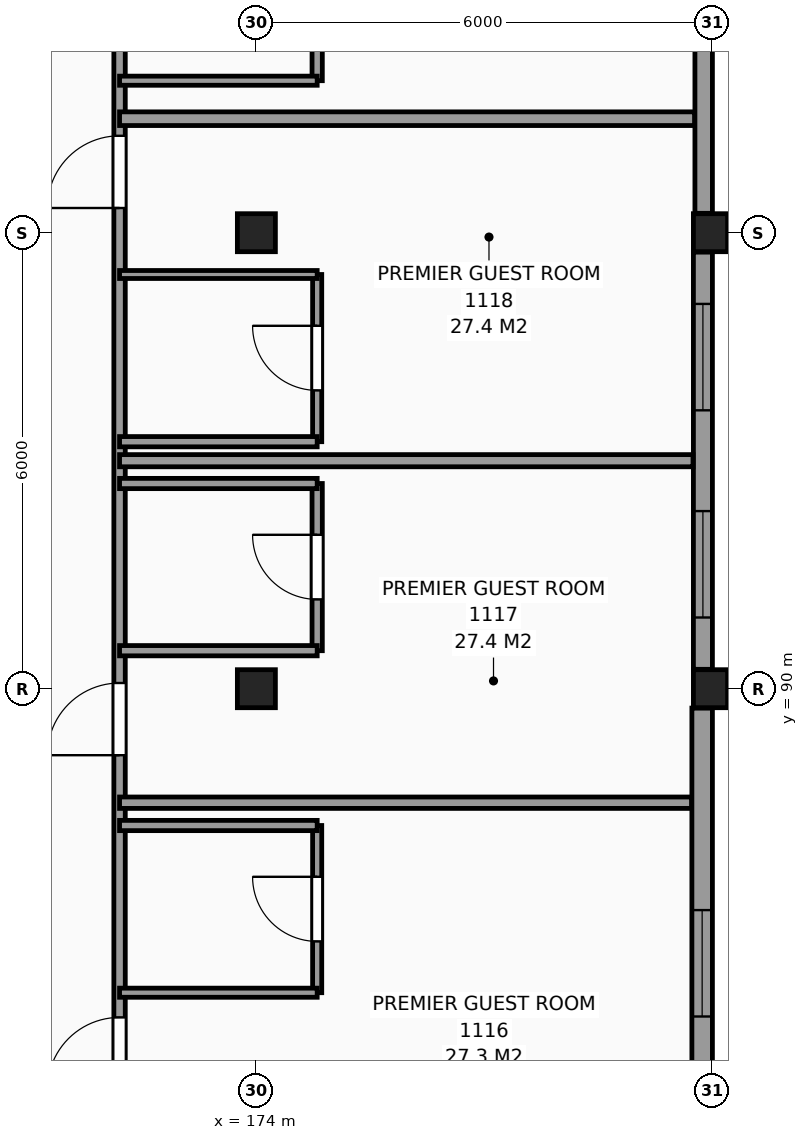
"""IFC4 building model, lengths in metres.
Left out: names, types, materials, properties, quantities, classifications, styles, units other than length and angle.
Written with IfcOpenShell. Run it as: python <this file> out.ifc"""

import sys

from ifc_helpers import new_model, si_unit, direction, frame, frame_2d, origin, origin_2d, place, context, subcontext, project, spatial, rectangle, extrude, element, fill, save


model = new_model("IFC4")
c1 = context("Model", 3, precision=1e-05, world=origin(), true_north=direction((0.0, 1.0)))
c2 = subcontext(c1, "Body", "Model", "MODEL_VIEW")
j1 = project(units=[si_unit("LENGTHUNIT", "METRE"), si_unit("PLANEANGLEUNIT", "RADIAN")], contexts=[c1])
p1 = place(None, origin())
s1 = spatial("IfcSite", under=j1, at=p1, CompositionType="ELEMENT")
p2 = place(p1, origin())
s2 = spatial("IfcBuilding", under=s1, at=p2, CompositionType="ELEMENT")
p3 = place(p2, frame((0.0, 0.0, 44.7)))
s3 = spatial("IfcBuildingStorey", under=s2, at=p3, CompositionType="ELEMENT", Elevation=44.7)
for number, where, z_axis, x_axis in (
    (1, (174.0, 90.0, 0.0), (0.0, 0.0, 1.0), (1.0, 0.0, 0.0)),
    (2, (174.0, 96.0, 0.0), (0.0, 0.0, 1.0), (1.0, 0.0, 0.0)),
    (3, (180.0, 90.0, 0.0), (0.0, 0.0, 1.0), (1.0, 0.0, 0.0)),
    (4, (180.0, 96.0, 0.0), (0.0, 0.0, 1.0), (1.0, 0.0, 0.0)),
):
    element("IfcColumn", number, at=place(p3, frame(where, z_axis=z_axis, x_axis=x_axis)), inside=s3, PredefinedType="COLUMN", context=c2, shape_type="SweptSolid", body=[
        extrude(rectangle(XDim=0.5, YDim=0.5, at=origin_2d()), origin(), (0.0, 0.0, 1.0), 3.3),
    ])
p4 = place(p3, frame((179.865, 84.255, 0.0), z_axis=(0.0, 0.0, 1.0), x_axis=(0.0, 1.0, 0.0)))
e5 = element("IfcWall", 5, at=p4, inside=s3, PredefinedType="SOLIDWALL", context=c2, shape_type="SweptSolid", body=[
    extrude(rectangle(XDim=5.49, YDim=0.27, at=frame_2d((2.745, 0.0))), origin(), (0.0, 0.0, 1.0), 2.4),
])
p5 = place(p4, frame((1.432, 0.0, 0.8)))
e6 = element("IfcOpeningElement", 6, at=p5, cuts=e5, PredefinedType="OPENING", context=c2, shape_type="SweptSolid", body=[
    extrude(rectangle(XDim=1.4, YDim=1.4, at=frame_2d((0.7, 0.7))), frame((0.0, 0.145, 0.0), z_axis=(0.0, -1.0, 0.0), x_axis=(1.0, 0.0, 0.0)), (0.0, 0.0, 1.0), 0.29),
])
p6 = place(p3, frame((179.875, 90.255, 0.0), z_axis=(0.0, 0.0, 1.0), x_axis=(0.0, 1.0, 0.0)))
e7 = element("IfcWall", 7, at=p6, inside=s3, PredefinedType="SOLIDWALL", context=c2, shape_type="SweptSolid", body=[
    extrude(rectangle(XDim=5.49, YDim=0.25, at=frame_2d((2.745, 0.0))), origin(), (0.0, 0.0, 1.0), 2.4),
])
p7 = place(p6, frame((0.682, 0.0, 0.8)))
e8 = element("IfcOpeningElement", 8, at=p7, cuts=e7, PredefinedType="OPENING", context=c2, shape_type="SweptSolid", body=[
    extrude(rectangle(XDim=1.4, YDim=1.4, at=frame_2d((0.7, 0.7))), frame((0.0, 0.135, 0.0), z_axis=(0.0, -1.0, 0.0), x_axis=(1.0, 0.0, 0.0)), (0.0, 0.0, 1.0), 0.27),
])
p8 = place(p6, frame((3.408, 0.0, 0.8)))
e9 = element("IfcOpeningElement", 9, at=p8, cuts=e7, PredefinedType="OPENING", context=c2, shape_type="SweptSolid", body=[
    extrude(rectangle(XDim=1.4, YDim=1.4, at=frame_2d((0.7, 0.7))), frame((0.0, 0.135, 0.0), z_axis=(0.0, -1.0, 0.0), x_axis=(1.0, 0.0, 0.0)), (0.0, 0.0, 1.0), 0.27),
])
p9 = place(p3, frame((179.885, 96.255, 0.0), z_axis=(0.0, 0.0, 1.0), x_axis=(0.0, 1.0, 0.0)))
e10 = element("IfcWall", 10, at=p9, inside=s3, PredefinedType="SOLIDWALL", context=c2, shape_type="SweptSolid", body=[
    extrude(rectangle(XDim=5.49, YDim=0.23, at=frame_2d((2.745, 0.0))), origin(), (0.0, 0.0, 1.0), 2.4),
])
p10 = place(p3, frame((172.2, 66.255, 0.0), z_axis=(0.0, 0.0, 1.0), x_axis=(0.0, 1.0, 0.0)))
e11 = element("IfcWall", 11, at=p10, inside=s3, PredefinedType="PARTITIONING", context=c2, shape_type="SweptSolid", body=[
    extrude(rectangle(XDim=41.565, YDim=0.15, at=frame_2d((20.783, 0.0))), origin(), (0.0, 0.0, 1.0), 3.05),
])
p11 = place(p10, frame((7.57, 0.0, 0.0)))
e12 = element("IfcOpeningElement", 12, at=p11, cuts=e11, PredefinedType="OPENING", context=c2, shape_type="SweptSolid", body=[
    extrude(rectangle(XDim=0.95, YDim=2.1, at=frame_2d((0.475, 1.05))), frame((0.0, 0.085, 0.0), z_axis=(0.0, -1.0, 0.0), x_axis=(1.0, 0.0, 0.0)), (0.0, 0.0, 1.0), 0.17),
])
p12 = place(p10, frame((9.37, 0.0, 0.0)))
e13 = element("IfcOpeningElement", 13, at=p12, cuts=e11, PredefinedType="OPENING", context=c2, shape_type="SweptSolid", body=[
    extrude(rectangle(XDim=0.95, YDim=2.1, at=frame_2d((0.475, 1.05))), frame((0.0, 0.085, 0.0), z_axis=(0.0, -1.0, 0.0), x_axis=(1.0, 0.0, 0.0)), (0.0, 0.0, 1.0), 0.17),
])
p13 = place(p10, frame((18.47, 0.0, 0.0)))
e14 = element("IfcOpeningElement", 14, at=p13, cuts=e11, PredefinedType="OPENING", context=c2, shape_type="SweptSolid", body=[
    extrude(rectangle(XDim=0.95, YDim=2.1, at=frame_2d((0.475, 1.05))), frame((0.0, 0.085, 0.0), z_axis=(0.0, -1.0, 0.0), x_axis=(1.0, 0.0, 0.0)), (0.0, 0.0, 1.0), 0.17),
])
p14 = place(p10, frame((22.87, 0.0, 0.0)))
e15 = element("IfcOpeningElement", 15, at=p14, cuts=e11, PredefinedType="OPENING", context=c2, shape_type="SweptSolid", body=[
    extrude(rectangle(XDim=0.95, YDim=2.1, at=frame_2d((0.475, 1.05))), frame((0.0, 0.085, 0.0), z_axis=(0.0, -1.0, 0.0), x_axis=(1.0, 0.0, 0.0)), (0.0, 0.0, 1.0), 0.17),
])
p15 = place(p10, frame((30.07, 0.0, 0.0)))
e16 = element("IfcOpeningElement", 16, at=p15, cuts=e11, PredefinedType="OPENING", context=c2, shape_type="SweptSolid", body=[
    extrude(rectangle(XDim=0.95, YDim=2.1, at=frame_2d((0.475, 1.05))), frame((0.0, 0.085, 0.0), z_axis=(0.0, -1.0, 0.0), x_axis=(1.0, 0.0, 0.0)), (0.0, 0.0, 1.0), 0.17),
])
p16 = place(p10, frame((38.32, 0.0, 0.0)))
e17 = element("IfcOpeningElement", 17, at=p16, cuts=e11, PredefinedType="OPENING", context=c2, shape_type="SweptSolid", body=[
    extrude(rectangle(XDim=0.95, YDim=2.1, at=frame_2d((0.475, 1.05))), frame((0.0, 0.085, 0.0), z_axis=(0.0, -1.0, 0.0), x_axis=(1.0, 0.0, 0.0)), (0.0, 0.0, 1.0), 0.17),
])
p17 = place(p3, frame((174.8, 86.0, 0.0), z_axis=(0.0, 0.0, 1.0), x_axis=(0.0, 1.0, 0.0)))
e18 = element("IfcWall", 18, at=p17, inside=s3, PredefinedType="PARTITIONING", context=c2, shape_type="SweptSolid", body=[
    extrude(rectangle(XDim=2.2, YDim=0.12, at=frame_2d((1.1, 0.0))), origin(), (0.0, 0.0, 1.0), 3.05),
])
p18 = place(p17, frame((0.675, 0.0, 0.0)))
e19 = element("IfcOpeningElement", 19, at=p18, cuts=e18, PredefinedType="OPENING", context=c2, shape_type="SweptSolid", body=[
    extrude(rectangle(XDim=0.85, YDim=2.1, at=frame_2d((0.425, 1.05))), frame((0.0, 0.07, 0.0), z_axis=(0.0, -1.0, 0.0), x_axis=(1.0, 0.0, 0.0)), (0.0, 0.0, 1.0), 0.14),
])
p19 = place(p3, frame((174.8, 90.5, 0.0), z_axis=(0.0, 0.0, 1.0), x_axis=(0.0, 1.0, 0.0)))
e20 = element("IfcWall", 20, at=p19, inside=s3, PredefinedType="PARTITIONING", context=c2, shape_type="SweptSolid", body=[
    extrude(rectangle(XDim=2.2, YDim=0.135, at=frame_2d((1.1, 0.0))), origin(), (0.0, 0.0, 1.0), 3.05),
])
p20 = place(p19, frame((0.675, 0.0, 0.0)))
e21 = element("IfcOpeningElement", 21, at=p20, cuts=e20, PredefinedType="OPENING", context=c2, shape_type="SweptSolid", body=[
    extrude(rectangle(XDim=0.85, YDim=2.1, at=frame_2d((0.425, 1.05))), frame((0.0, 0.078, 0.0), z_axis=(0.0, -1.0, 0.0), x_axis=(1.0, 0.0, 0.0)), (0.0, 0.0, 1.0), 0.155),
])
p21 = place(p3, frame((174.8, 93.25, 0.0), z_axis=(0.0, 0.0, 1.0), x_axis=(0.0, 1.0, 0.0)))
e22 = element("IfcWall", 22, at=p21, inside=s3, PredefinedType="PARTITIONING", context=c2, shape_type="SweptSolid", body=[
    extrude(rectangle(XDim=2.2, YDim=0.12, at=frame_2d((1.1, 0.0))), origin(), (0.0, 0.0, 1.0), 3.05),
])
p22 = place(p21, frame((0.675, 0.0, 0.0)))
e23 = element("IfcOpeningElement", 23, at=p22, cuts=e22, PredefinedType="OPENING", context=c2, shape_type="SweptSolid", body=[
    extrude(rectangle(XDim=0.85, YDim=2.1, at=frame_2d((0.425, 1.05))), frame((0.0, 0.07, 0.0), z_axis=(0.0, -1.0, 0.0), x_axis=(1.0, 0.0, 0.0)), (0.0, 0.0, 1.0), 0.14),
])
p23 = place(p3, frame((174.8, 98.0, 0.0), z_axis=(0.0, 0.0, 1.0), x_axis=(0.0, 1.0, 0.0)))
e24 = element("IfcWall", 24, at=p23, inside=s3, PredefinedType="PARTITIONING", context=c2, shape_type="SweptSolid", body=[
    extrude(rectangle(XDim=2.2, YDim=0.135, at=frame_2d((1.1, 0.0))), origin(), (0.0, 0.0, 1.0), 3.05),
])
p24 = place(p23, frame((0.675, 0.0, 0.0)))
e25 = element("IfcOpeningElement", 25, at=p24, cuts=e24, PredefinedType="OPENING", context=c2, shape_type="SweptSolid", body=[
    extrude(rectangle(XDim=0.85, YDim=2.1, at=frame_2d((0.425, 1.05))), frame((0.0, 0.078, 0.0), z_axis=(0.0, -1.0, 0.0), x_axis=(1.0, 0.0, 0.0)), (0.0, 0.0, 1.0), 0.155),
])
p25 = place(p3, frame((172.2, 86.0, 0.0), z_axis=(0.0, 0.0, 1.0), x_axis=(1.0, 0.0, 0.0)))
e26 = element("IfcWall", 26, at=p25, inside=s3, PredefinedType="PARTITIONING", context=c2, shape_type="SweptSolid", body=[
    extrude(rectangle(XDim=2.6, YDim=0.12, at=frame_2d((1.3, 0.0))), origin(), (0.0, 0.0, 1.0), 3.05),
])
p26 = place(p3, frame((172.2, 88.2, 0.0), z_axis=(0.0, 0.0, 1.0), x_axis=(1.0, 0.0, 0.0)))
e27 = element("IfcWall", 27, at=p26, inside=s3, PredefinedType="PARTITIONING", context=c2, shape_type="SweptSolid", body=[
    extrude(rectangle(XDim=2.6, YDim=0.135, at=frame_2d((1.3, 0.0))), origin(), (0.0, 0.0, 1.0), 3.05),
])
p27 = place(p3, frame((172.2, 88.5, 0.0), z_axis=(0.0, 0.0, 1.0), x_axis=(1.0, 0.0, 0.0)))
e28 = element("IfcWall", 28, at=p27, inside=s3, PredefinedType="PARTITIONING", context=c2, shape_type="SweptSolid", body=[
    extrude(rectangle(XDim=7.525, YDim=0.15, at=frame_2d((3.763, 0.0))), origin(), (0.0, 0.0, 1.0), 3.05),
])
for number, where, z_axis, x_axis in (
    (29, (172.2, 90.5, 0.0), (0.0, 0.0, 1.0), (1.0, 0.0, 0.0)),
    (30, (172.2, 92.7, 0.0), (0.0, 0.0, 1.0), (1.0, 0.0, 0.0)),
):
    element("IfcWall", number, at=place(p3, frame(where, z_axis=z_axis, x_axis=x_axis)), inside=s3, PredefinedType="PARTITIONING", context=c2, shape_type="SweptSolid", body=[
        extrude(rectangle(XDim=2.6, YDim=0.135, at=frame_2d((1.3, 0.0))), origin(), (0.0, 0.0, 1.0), 3.05),
    ])
p28 = place(p3, frame((172.2, 93.0, 0.0), z_axis=(0.0, 0.0, 1.0), x_axis=(1.0, 0.0, 0.0)))
e31 = element("IfcWall", 31, at=p28, inside=s3, PredefinedType="PARTITIONING", context=c2, shape_type="SweptSolid", body=[
    extrude(rectangle(XDim=7.545, YDim=0.16, at=frame_2d((3.772, 0.0))), origin(), (0.0, 0.0, 1.0), 3.05),
])
p29 = place(p3, frame((172.2, 93.25, 0.0), z_axis=(0.0, 0.0, 1.0), x_axis=(1.0, 0.0, 0.0)))
e32 = element("IfcWall", 32, at=p29, inside=s3, PredefinedType="PARTITIONING", context=c2, shape_type="SweptSolid", body=[
    extrude(rectangle(XDim=2.6, YDim=0.135, at=frame_2d((1.3, 0.0))), origin(), (0.0, 0.0, 1.0), 3.05),
])
p30 = place(p3, frame((172.2, 95.45, 0.0), z_axis=(0.0, 0.0, 1.0), x_axis=(1.0, 0.0, 0.0)))
e33 = element("IfcWall", 33, at=p30, inside=s3, PredefinedType="PARTITIONING", context=c2, shape_type="SweptSolid", body=[
    extrude(rectangle(XDim=2.6, YDim=0.105, at=frame_2d((1.3, 0.0))), origin(), (0.0, 0.0, 1.0), 3.05),
])
p31 = place(p3, frame((172.2, 97.5, 0.0), z_axis=(0.0, 0.0, 1.0), x_axis=(1.0, 0.0, 0.0)))
e34 = element("IfcWall", 34, at=p31, inside=s3, PredefinedType="PARTITIONING", context=c2, shape_type="SweptSolid", body=[
    extrude(rectangle(XDim=7.565, YDim=0.18, at=frame_2d((3.782, 0.0))), origin(), (0.0, 0.0, 1.0), 3.05),
])
p32 = place(p3, frame((172.2, 98.0, 0.0), z_axis=(0.0, 0.0, 1.0), x_axis=(1.0, 0.0, 0.0)))
e35 = element("IfcWall", 35, at=p32, inside=s3, PredefinedType="PARTITIONING", context=c2, shape_type="SweptSolid", body=[
    extrude(rectangle(XDim=2.6, YDim=0.12, at=frame_2d((1.3, 0.0))), origin(), (0.0, 0.0, 1.0), 3.05),
])
p33 = place(p5, origin())
e36 = element("IfcWindow", 36, at=p33, inside=s3, PartitioningType="SINGLE_PANEL", PredefinedType="WINDOW", context=c2, shape_type="SweptSolid", body=[
    extrude(rectangle(XDim=1.4, YDim=1.4, at=frame_2d((0.7, 0.7))), frame((0.0, 0.03, 0.0), z_axis=(0.0, -1.0, 0.0), x_axis=(1.0, 0.0, 0.0)), (0.0, 0.0, 1.0), 0.06),
])
fill(e6, e36)
p34 = place(p7, origin())
e37 = element("IfcWindow", 37, at=p34, inside=s3, PartitioningType="SINGLE_PANEL", PredefinedType="WINDOW", context=c2, shape_type="SweptSolid", body=[
    extrude(rectangle(XDim=1.4, YDim=1.4, at=frame_2d((0.7, 0.7))), frame((0.0, 0.03, 0.0), z_axis=(0.0, -1.0, 0.0), x_axis=(1.0, 0.0, 0.0)), (0.0, 0.0, 1.0), 0.06),
])
fill(e8, e37)
p35 = place(p8, origin())
e38 = element("IfcWindow", 38, at=p35, inside=s3, PartitioningType="SINGLE_PANEL", PredefinedType="WINDOW", context=c2, shape_type="SweptSolid", body=[
    extrude(rectangle(XDim=1.4, YDim=1.4, at=frame_2d((0.7, 0.7))), frame((0.0, 0.03, 0.0), z_axis=(0.0, -1.0, 0.0), x_axis=(1.0, 0.0, 0.0)), (0.0, 0.0, 1.0), 0.06),
])
fill(e9, e38)
p36 = place(p18, origin())
e39 = element("IfcDoor", 39, at=p36, inside=s3, OperationType="SINGLE_SWING_RIGHT", PredefinedType="DOOR", context=c2, shape_type="SweptSolid", body=[
    extrude(rectangle(XDim=0.85, YDim=2.1, at=frame_2d((0.425, 1.05))), frame((0.0, 0.025, 0.0), z_axis=(0.0, -1.0, 0.0), x_axis=(1.0, 0.0, 0.0)), (0.0, 0.0, 1.0), 0.05),
])
fill(e19, e39)
p37 = place(p13, origin())
e40 = element("IfcDoor", 40, at=p37, inside=s3, OperationType="SINGLE_SWING_LEFT", PredefinedType="DOOR", context=c2, shape_type="SweptSolid", body=[
    extrude(rectangle(XDim=0.95, YDim=2.1, at=frame_2d((0.475, 1.05))), frame((0.0, 0.025, 0.0), z_axis=(0.0, -1.0, 0.0), x_axis=(1.0, 0.0, 0.0)), (0.0, 0.0, 1.0), 0.05),
])
fill(e14, e40)
p38 = place(p20, origin())
e41 = element("IfcDoor", 41, at=p38, inside=s3, OperationType="SINGLE_SWING_RIGHT", PredefinedType="DOOR", context=c2, shape_type="SweptSolid", body=[
    extrude(rectangle(XDim=0.85, YDim=2.1, at=frame_2d((0.425, 1.05))), frame((0.0, 0.025, 0.0), z_axis=(0.0, -1.0, 0.0), x_axis=(1.0, 0.0, 0.0)), (0.0, 0.0, 1.0), 0.05),
])
fill(e21, e41)
p39 = place(p14, origin())
e42 = element("IfcDoor", 42, at=p39, inside=s3, OperationType="SINGLE_SWING_LEFT", PredefinedType="DOOR", context=c2, shape_type="SweptSolid", body=[
    extrude(rectangle(XDim=0.95, YDim=2.1, at=frame_2d((0.475, 1.05))), frame((0.0, 0.025, 0.0), z_axis=(0.0, -1.0, 0.0), x_axis=(1.0, 0.0, 0.0)), (0.0, 0.0, 1.0), 0.05),
])
fill(e15, e42)
p40 = place(p22, origin())
e43 = element("IfcDoor", 43, at=p40, inside=s3, OperationType="SINGLE_SWING_RIGHT", PredefinedType="DOOR", context=c2, shape_type="SweptSolid", body=[
    extrude(rectangle(XDim=0.85, YDim=2.1, at=frame_2d((0.425, 1.05))), frame((0.0, 0.025, 0.0), z_axis=(0.0, -1.0, 0.0), x_axis=(1.0, 0.0, 0.0)), (0.0, 0.0, 1.0), 0.05),
])
fill(e23, e43)
p41 = place(p15, origin())
e44 = element("IfcDoor", 44, at=p41, inside=s3, OperationType="SINGLE_SWING_LEFT", PredefinedType="DOOR", context=c2, shape_type="SweptSolid", body=[
    extrude(rectangle(XDim=0.95, YDim=2.1, at=frame_2d((0.475, 1.05))), frame((0.0, 0.025, 0.0), z_axis=(0.0, -1.0, 0.0), x_axis=(1.0, 0.0, 0.0)), (0.0, 0.0, 1.0), 0.05),
])
fill(e16, e44)
save(model, sys.argv[1])
